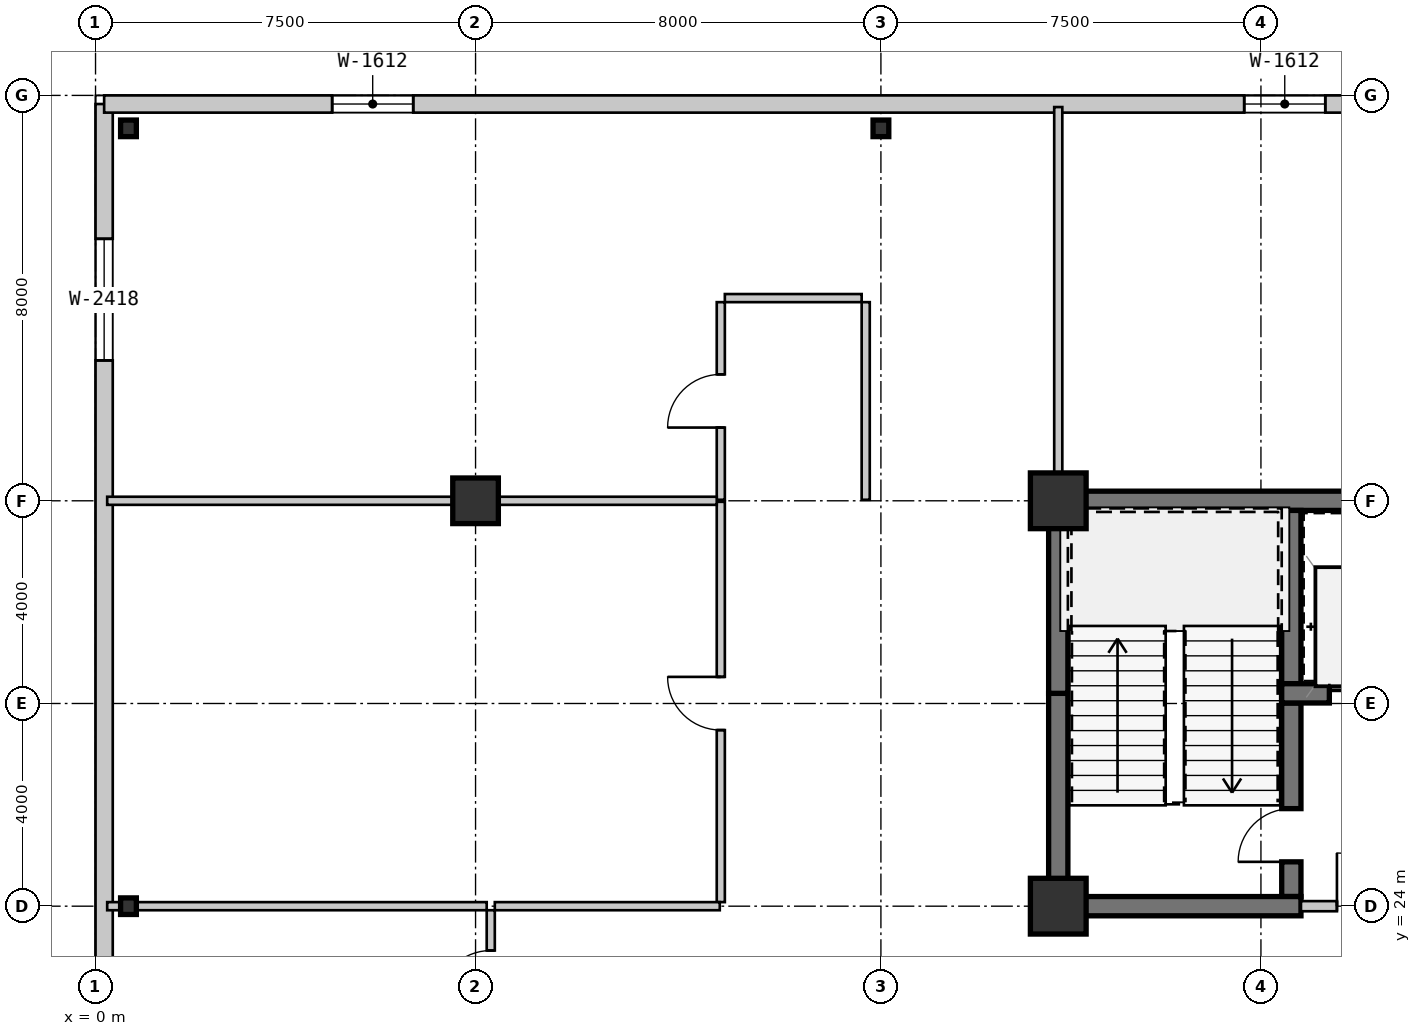
"""IFC4 building model, lengths in metres.
Left out: names, types, materials, properties, quantities, classifications, styles, units other than length and angle.
Written with IfcOpenShell. Run it as: python <this file> out.ifc"""

import sys

from ifc_helpers import new_model, si_unit, direction, frame, frame_2d, origin, origin_2d, place, context, subcontext, project, spatial, rectangle, circle, i_section, extrude, source, transform, mapped, element, fill, save


model = new_model("IFC4")
c1 = context("Model", 3, precision=1e-05, world=origin(), true_north=direction((0.0, 1.0)))
c2 = subcontext(c1, "Body", "Model", "MODEL_VIEW")
j1 = project(units=[si_unit("LENGTHUNIT", "METRE"), si_unit("PLANEANGLEUNIT", "RADIAN")], contexts=[c1])
p1 = place(None, origin())
s1 = spatial("IfcSite", under=j1, at=p1, CompositionType="ELEMENT")
p2 = place(p1, origin())
s2 = spatial("IfcBuilding", under=s1, at=p2, CompositionType="ELEMENT")
p3 = place(p2, frame((0.0, 0.0, 8.4)))
s3 = spatial("IfcBuildingStorey", under=s2, at=p3, CompositionType="ELEMENT", Elevation=8.4)
m1 = source(origin(), c2, "Body", "SweptSolid", [
    extrude(rectangle(XDim=1.1, YDim=1.1, at=origin_2d()), origin(), (0.0, 0.0, 1.0), 4.55),
])
for number, where, z_axis, x_axis in (
    (1, (19.0, 24.0, 0.0), (0.0, 0.0, 1.0), (1.0, 0.0, 0.0)),
    (2, (19.0, 32.0, 0.0), (0.0, 0.0, 1.0), (1.0, 0.0, 0.0)),
):
    element("IfcColumn", number, at=place(p3, frame(where, z_axis=z_axis, x_axis=x_axis)), inside=s3, PredefinedType="COLUMN", context=c2, shape_type="MappedRepresentation", body=[
        mapped(m1, transform((0.0, 0.0, 0.0), scale=1.0)),
    ])
m2 = source(origin(), c2, "Body", "SweptSolid", [
    extrude(circle(Radius=0.45, at=origin_2d()), origin(), (0.0, 0.0, 1.0), 4.55),
])
p4 = place(p3, frame((7.5, 32.0, 0.0), z_axis=(0.0, 0.0, 1.0), x_axis=(1.0, 0.0, 0.0)))
e3 = element("IfcColumn", 3, at=p4, inside=s3, PredefinedType="COLUMN", context=c2, shape_type="MappedRepresentation", body=[
    mapped(m2, transform((0.0, 0.0, 0.0), scale=1.0)),
])
m3 = source(origin(), c2, "Body", "SweptSolid", [
    extrude(i_section(OverallWidth=0.311, OverallDepth=0.327, WebThickness=0.016, FlangeThickness=0.025, at=origin_2d()), origin(), (0.0, 0.0, 1.0), 4.55),
])
for number, where, z_axis, x_axis in (
    (4, (0.65, 24.0, 0.0), (0.0, 0.0, 1.0), (1.0, 0.0, 0.0)),
    (5, (0.65, 39.35, 0.0), (0.0, 0.0, 1.0), (1.0, 0.0, 0.0)),
    (6, (15.5, 39.35, 0.0), (0.0, 0.0, 1.0), (1.0, 0.0, 0.0)),
):
    element("IfcColumn", number, at=place(p3, frame(where, z_axis=z_axis, x_axis=x_axis)), inside=s3, PredefinedType="COLUMN", context=c2, shape_type="MappedRepresentation", body=[
        mapped(m3, transform((0.0, 0.0, 0.0), scale=1.0)),
    ])
m4 = source(origin(), c2, "Body", "SweptSolid", [
    extrude(rectangle(XDim=39.66, YDim=0.34, at=frame_2d((19.83, 0.0))), origin(), (0.0, 0.0, 1.0), 4.29),
])
p5 = place(p3, frame((0.17, 0.17, 0.0), z_axis=(0.0, 0.0, 1.0), x_axis=(0.0, 1.0, 0.0)))
e7 = element("IfcWall", 7, at=p5, inside=s3, PredefinedType="SOLIDWALL", context=c2, shape_type="MappedRepresentation", body=[
    mapped(m4, transform((0.0, 0.0, 0.0), scale=1.0)),
])
m5 = source(origin(), c2, "Body", "SweptSolid", [
    extrude(rectangle(XDim=1.8, YDim=1.6, at=frame_2d((0.9, 0.8))), frame((0.0, 0.18, 0.0), z_axis=(0.0, -1.0, 0.0), x_axis=(1.0, 0.0, 0.0)), (0.0, 0.0, 1.0), 0.36),
])
p6 = place(p5, frame((3.2, 0.0, 0.95)))
e8 = element("IfcOpeningElement", 8, at=p6, cuts=e7, PredefinedType="OPENING", context=c2, shape_type="MappedRepresentation", body=[
    mapped(m5, transform((0.0, 0.0, 0.0), scale=1.0)),
])
m6 = source(origin(), c2, "Body", "SweptSolid", [
    extrude(rectangle(XDim=1.5, YDim=1.5, at=frame_2d((0.75, 0.75))), frame((0.0, 0.18, 0.0), z_axis=(0.0, -1.0, 0.0), x_axis=(1.0, 0.0, 0.0)), (0.0, 0.0, 1.0), 0.36),
])
p7 = place(p5, frame((7.8, 0.0, 0.95)))
e9 = element("IfcOpeningElement", 9, at=p7, cuts=e7, PredefinedType="OPENING", context=c2, shape_type="MappedRepresentation", body=[
    mapped(m6, transform((0.0, 0.0, 0.0), scale=1.0)),
])
m7 = source(origin(), c2, "Body", "SweptSolid", [
    extrude(rectangle(XDim=1.2, YDim=1.5, at=frame_2d((0.6, 0.75))), frame((0.0, 0.18, 0.0), z_axis=(0.0, -1.0, 0.0), x_axis=(1.0, 0.0, 0.0)), (0.0, 0.0, 1.0), 0.36),
])
p8 = place(p5, frame((21.2, 0.0, 0.95)))
e10 = element("IfcOpeningElement", 10, at=p8, cuts=e7, PredefinedType="OPENING", context=c2, shape_type="MappedRepresentation", body=[
    mapped(m7, transform((0.0, 0.0, 0.0), scale=1.0)),
])
m8 = source(origin(), c2, "Body", "SweptSolid", [
    extrude(rectangle(XDim=2.4, YDim=1.8, at=frame_2d((1.2, 0.9))), frame((0.0, 0.18, 0.0), z_axis=(0.0, -1.0, 0.0), x_axis=(1.0, 0.0, 0.0)), (0.0, 0.0, 1.0), 0.36),
])
p9 = place(p5, frame((34.6, 0.0, 0.95)))
e11 = element("IfcOpeningElement", 11, at=p9, cuts=e7, PredefinedType="OPENING", context=c2, shape_type="MappedRepresentation", body=[
    mapped(m8, transform((0.0, 0.0, 0.0), scale=1.0)),
])
m9 = source(origin(), c2, "Body", "SweptSolid", [
    extrude(rectangle(XDim=69.66, YDim=0.34, at=frame_2d((34.83, 0.0))), origin(), (0.0, 0.0, 1.0), 4.29),
])
p10 = place(p3, frame((0.17, 39.83, 0.0), z_axis=(0.0, 0.0, 1.0), x_axis=(1.0, 0.0, 0.0)))
e12 = element("IfcWall", 12, at=p10, inside=s3, PredefinedType="SOLIDWALL", context=c2, shape_type="MappedRepresentation", body=[
    mapped(m9, transform((0.0, 0.0, 0.0), scale=1.0)),
])
m10 = source(origin(), c2, "Body", "SweptSolid", [
    extrude(rectangle(XDim=1.6, YDim=1.2, at=frame_2d((0.8, 0.6))), frame((0.0, 0.18, 0.0), z_axis=(0.0, -1.0, 0.0), x_axis=(1.0, 0.0, 0.0)), (0.0, 0.0, 1.0), 0.36),
])
p11 = place(p10, frame((4.5, 0.0, 0.95)))
e13 = element("IfcOpeningElement", 13, at=p11, cuts=e12, PredefinedType="OPENING", context=c2, shape_type="MappedRepresentation", body=[
    mapped(m10, transform((0.0, 0.0, 0.0), scale=1.0)),
])
p12 = place(p10, frame((22.5, 0.0, 0.95)))
e14 = element("IfcOpeningElement", 14, at=p12, cuts=e12, PredefinedType="OPENING", context=c2, shape_type="MappedRepresentation", body=[
    mapped(m10, transform((0.0, 0.0, 0.0), scale=1.0)),
])
p13 = place(p10, frame((29.0, 0.0, 0.95)))
e15 = element("IfcOpeningElement", 15, at=p13, cuts=e12, PredefinedType="OPENING", context=c2, shape_type="MappedRepresentation", body=[
    mapped(m10, transform((0.0, 0.0, 0.0), scale=1.0)),
])
p14 = place(p10, frame((40.5, 0.0, 0.95)))
e16 = element("IfcOpeningElement", 16, at=p14, cuts=e12, PredefinedType="OPENING", context=c2, shape_type="MappedRepresentation", body=[
    mapped(m10, transform((0.0, 0.0, 0.0), scale=1.0)),
])
p15 = place(p10, frame((46.5, 0.0, 0.95)))
e17 = element("IfcOpeningElement", 17, at=p15, cuts=e12, PredefinedType="OPENING", context=c2, shape_type="MappedRepresentation", body=[
    mapped(m10, transform((0.0, 0.0, 0.0), scale=1.0)),
])
p16 = place(p10, frame((62.5, 0.0, 0.95)))
e18 = element("IfcOpeningElement", 18, at=p16, cuts=e12, PredefinedType="OPENING", context=c2, shape_type="MappedRepresentation", body=[
    mapped(m10, transform((0.0, 0.0, 0.0), scale=1.0)),
])
m11 = source(origin(), c2, "Body", "SweptSolid", [
    extrude(rectangle(XDim=9.19, YDim=0.38, at=frame_2d((4.595, 0.0))), origin(), (0.0, 0.0, 1.0), 4.29),
])
p17 = place(p3, frame((18.81, 32.0, 0.0), z_axis=(0.0, 0.0, 1.0), x_axis=(1.0, 0.0, 0.0)))
e19 = element("IfcWall", 19, at=p17, inside=s3, PredefinedType="SHEAR", context=c2, shape_type="MappedRepresentation", body=[
    mapped(m11, transform((0.0, 0.0, 0.0), scale=1.0)),
])
m12 = source(origin(), c2, "Body", "SweptSolid", [
    extrude(rectangle(XDim=4.01, YDim=0.38, at=frame_2d((2.005, 0.0))), origin(), (0.0, 0.0, 1.0), 4.29),
])
p18 = place(p3, frame((19.0, 24.19, 0.0), z_axis=(0.0, 0.0, 1.0), x_axis=(0.0, 1.0, 0.0)))
e20 = element("IfcWall", 20, at=p18, inside=s3, PredefinedType="SHEAR", context=c2, shape_type="MappedRepresentation", body=[
    mapped(m12, transform((0.0, 0.0, 0.0), scale=1.0)),
])
m13 = source(origin(), c2, "Body", "SweptSolid", [
    extrude(rectangle(XDim=3.61, YDim=0.38, at=frame_2d((1.805, 0.0))), origin(), (0.0, 0.0, 1.0), 4.29),
])
p19 = place(p3, frame((19.0, 28.2, 0.0), z_axis=(0.0, 0.0, 1.0), x_axis=(0.0, 1.0, 0.0)))
e21 = element("IfcWall", 21, at=p19, inside=s3, PredefinedType="SHEAR", context=c2, shape_type="MappedRepresentation", body=[
    mapped(m13, transform((0.0, 0.0, 0.0), scale=1.0)),
])
m14 = source(origin(), c2, "Body", "SweptSolid", [
    extrude(rectangle(XDim=3.42, YDim=0.38, at=frame_2d((1.71, 0.0))), origin(), (0.0, 0.0, 1.0), 4.29),
])
p20 = place(p3, frame((23.6, 28.39, 0.0), z_axis=(0.0, 0.0, 1.0), x_axis=(0.0, 1.0, 0.0)))
e22 = element("IfcWall", 22, at=p20, inside=s3, PredefinedType="SHEAR", context=c2, shape_type="MappedRepresentation", body=[
    mapped(m14, transform((0.0, 0.0, 0.0), scale=1.0)),
])
m15 = source(origin(), c2, "Body", "SweptSolid", [
    extrude(rectangle(XDim=3.82, YDim=0.38, at=frame_2d((1.91, 0.0))), origin(), (0.0, 0.0, 1.0), 4.29),
])
p21 = place(p3, frame((23.6, 24.19, 0.0), z_axis=(0.0, 0.0, 1.0), x_axis=(0.0, 1.0, 0.0)))
e23 = element("IfcWall", 23, at=p21, inside=s3, PredefinedType="SHEAR", context=c2, shape_type="MappedRepresentation", body=[
    mapped(m15, transform((0.0, 0.0, 0.0), scale=1.0)),
])
m16 = source(origin(), c2, "Body", "SweptSolid", [
    extrude(rectangle(XDim=1.05, YDim=2.1, at=frame_2d((0.525, 1.05))), frame((0.0, 0.2, 0.0), z_axis=(0.0, -1.0, 0.0), x_axis=(1.0, 0.0, 0.0)), (0.0, 0.0, 1.0), 0.4),
])
p22 = place(p21, frame((0.685, 0.0, 0.0)))
e24 = element("IfcOpeningElement", 24, at=p22, cuts=e23, PredefinedType="OPENING", context=c2, shape_type="MappedRepresentation", body=[
    mapped(m16, transform((0.0, 0.0, 0.0), scale=1.0)),
])
m17 = source(origin(), c2, "Body", "SweptSolid", [
    extrude(rectangle(XDim=4.98, YDim=0.38, at=frame_2d((2.49, 0.0))), origin(), (0.0, 0.0, 1.0), 4.29),
])
p23 = place(p3, frame((18.81, 24.0, 0.0), z_axis=(0.0, 0.0, 1.0), x_axis=(1.0, 0.0, 0.0)))
e25 = element("IfcWall", 25, at=p23, inside=s3, PredefinedType="SHEAR", context=c2, shape_type="MappedRepresentation", body=[
    mapped(m17, transform((0.0, 0.0, 0.0), scale=1.0)),
])
m18 = source(origin(), c2, "Body", "SweptSolid", [
    extrude(rectangle(XDim=2.98, YDim=0.38, at=frame_2d((1.49, 0.0))), origin(), (0.0, 0.0, 1.0), 4.29),
])
p24 = place(p3, frame((23.41, 28.2, 0.0), z_axis=(0.0, 0.0, 1.0), x_axis=(1.0, 0.0, 0.0)))
e26 = element("IfcWall", 26, at=p24, inside=s3, PredefinedType="SHEAR", context=c2, shape_type="MappedRepresentation", body=[
    mapped(m18, transform((0.0, 0.0, 0.0), scale=1.0)),
])
m19 = source(origin(), c2, "Body", "SweptSolid", [
    extrude(rectangle(XDim=1.1, YDim=2.15, at=frame_2d((0.55, 1.075))), frame((0.0, 0.2, 0.0), z_axis=(0.0, -1.0, 0.0), x_axis=(1.0, 0.0, 0.0)), (0.0, 0.0, 1.0), 0.4),
])
p25 = place(p24, frame((0.94, 0.0, 0.0)))
e27 = element("IfcOpeningElement", 27, at=p25, cuts=e26, PredefinedType="OPENING", context=c2, shape_type="MappedRepresentation", body=[
    mapped(m19, transform((0.0, 0.0, 0.0), scale=1.0)),
])
m20 = source(origin(), c2, "Body", "SweptSolid", [
    extrude(rectangle(XDim=2.66, YDim=0.2, at=frame_2d((1.33, 0.0))), origin(), (0.0, 0.0, 1.0), 3.83),
])
p26 = place(p3, frame((23.79, 24.0, 0.0), z_axis=(0.0, 0.0, 1.0), x_axis=(1.0, 0.0, 0.0)))
e28 = element("IfcWall", 28, at=p26, inside=s3, PredefinedType="SOLIDWALL", context=c2, shape_type="MappedRepresentation", body=[
    mapped(m20, transform((0.0, 0.0, 0.0), scale=1.0)),
])
m21 = source(origin(), c2, "Body", "SweptSolid", [
    extrude(rectangle(XDim=1.05, YDim=2.1, at=frame_2d((0.525, 1.05))), frame((0.0, 0.11, 0.0), z_axis=(0.0, -1.0, 0.0), x_axis=(1.0, 0.0, 0.0)), (0.0, 0.0, 1.0), 0.22),
])
p27 = place(p26, frame((0.71, 0.0, 0.0)))
e29 = element("IfcOpeningElement", 29, at=p27, cuts=e28, PredefinedType="OPENING", context=c2, shape_type="MappedRepresentation", body=[
    mapped(m21, transform((0.0, 0.0, 0.0), scale=1.0)),
])
m22 = source(origin(), c2, "Body", "SweptSolid", [
    extrude(rectangle(XDim=2.64, YDim=0.16, at=frame_2d((1.32, 0.0))), origin(), (0.0, 0.0, 1.0), 4.29),
])
p28 = place(p3, frame((7.8, 21.28, 0.0), z_axis=(0.0, 0.0, 1.0), x_axis=(0.0, 1.0, 0.0)))
e30 = element("IfcWall", 30, at=p28, inside=s3, PredefinedType="PARTITIONING", context=c2, shape_type="MappedRepresentation", body=[
    mapped(m22, transform((0.0, 0.0, 0.0), scale=1.0)),
])
m23 = source(origin(), c2, "Body", "SweptSolid", [
    extrude(rectangle(XDim=1.05, YDim=2.1, at=frame_2d((0.525, 1.05))), frame((0.0, 0.09, 0.0), z_axis=(0.0, -1.0, 0.0), x_axis=(1.0, 0.0, 0.0)), (0.0, 0.0, 1.0), 0.18),
])
p29 = place(p28, frame((0.795, 0.0, 0.0)))
e31 = element("IfcOpeningElement", 31, at=p29, cuts=e30, PredefinedType="OPENING", context=c2, shape_type="MappedRepresentation", body=[
    mapped(m23, transform((0.0, 0.0, 0.0), scale=1.0)),
])
m24 = source(origin(), c2, "Body", "SweptSolid", [
    extrude(rectangle(XDim=7.9, YDim=0.16, at=frame_2d((3.95, 0.0))), origin(), (0.0, 0.0, 1.0), 4.29),
])
p30 = place(p3, frame((12.34, 24.08, 0.0), z_axis=(0.0, 0.0, 1.0), x_axis=(0.0, 1.0, 0.0)))
e32 = element("IfcWall", 32, at=p30, inside=s3, PredefinedType="PARTITIONING", context=c2, shape_type="MappedRepresentation", body=[
    mapped(m24, transform((0.0, 0.0, 0.0), scale=1.0)),
])
p31 = place(p30, frame((3.395, 0.0, 0.0)))
e33 = element("IfcOpeningElement", 33, at=p31, cuts=e32, PredefinedType="OPENING", context=c2, shape_type="MappedRepresentation", body=[
    mapped(m23, transform((0.0, 0.0, 0.0), scale=1.0)),
])
m25 = source(origin(), c2, "Body", "SweptSolid", [
    extrude(rectangle(XDim=4.44, YDim=0.16, at=frame_2d((2.22, 0.0))), origin(), (0.0, 0.0, 1.0), 4.29),
])
p32 = place(p3, frame((7.88, 24.0, 0.0), z_axis=(0.0, 0.0, 1.0), x_axis=(1.0, 0.0, 0.0)))
e34 = element("IfcWall", 34, at=p32, inside=s3, PredefinedType="PARTITIONING", context=c2, shape_type="MappedRepresentation", body=[
    mapped(m25, transform((0.0, 0.0, 0.0), scale=1.0)),
])
m26 = source(origin(), c2, "Body", "SweptSolid", [
    extrude(rectangle(XDim=3.9, YDim=0.16, at=frame_2d((1.95, 0.0))), origin(), (0.0, 0.0, 1.0), 4.29),
])
p33 = place(p3, frame((12.34, 32.02, 0.0), z_axis=(0.0, 0.0, 1.0), x_axis=(0.0, 1.0, 0.0)))
e35 = element("IfcWall", 35, at=p33, inside=s3, PredefinedType="PARTITIONING", context=c2, shape_type="MappedRepresentation", body=[
    mapped(m26, transform((0.0, 0.0, 0.0), scale=1.0)),
])
p34 = place(p33, frame((1.425, 0.0, 0.0)))
e36 = element("IfcOpeningElement", 36, at=p34, cuts=e35, PredefinedType="OPENING", context=c2, shape_type="MappedRepresentation", body=[
    mapped(m23, transform((0.0, 0.0, 0.0), scale=1.0)),
])
p35 = place(p3, frame((15.2, 35.92, 0.0), z_axis=(0.0, 0.0, 1.0), x_axis=(0.0, -1.0, 0.0)))
e37 = element("IfcWall", 37, at=p35, inside=s3, PredefinedType="PARTITIONING", context=c2, shape_type="MappedRepresentation", body=[
    mapped(m26, transform((0.0, 0.0, 0.0), scale=1.0)),
])
m27 = source(origin(), c2, "Body", "SweptSolid", [
    extrude(rectangle(XDim=2.7, YDim=0.16, at=frame_2d((1.35, 0.0))), origin(), (0.0, 0.0, 1.0), 4.29),
])
p36 = place(p3, frame((12.42, 36.0, 0.0), z_axis=(0.0, 0.0, 1.0), x_axis=(1.0, 0.0, 0.0)))
e38 = element("IfcWall", 38, at=p36, inside=s3, PredefinedType="PARTITIONING", context=c2, shape_type="MappedRepresentation", body=[
    mapped(m27, transform((0.0, 0.0, 0.0), scale=1.0)),
])
m28 = source(origin(), c2, "Body", "SweptSolid", [
    extrude(rectangle(XDim=7.49, YDim=0.16, at=frame_2d((3.745, 0.0))), origin(), (0.0, 0.0, 1.0), 4.29),
])
p37 = place(p3, frame((0.23, 24.0, 0.0), z_axis=(0.0, 0.0, 1.0), x_axis=(1.0, 0.0, 0.0)))
e39 = element("IfcWall", 39, at=p37, inside=s3, PredefinedType="PARTITIONING", context=c2, shape_type="MappedRepresentation", body=[
    mapped(m28, transform((0.0, 0.0, 0.0), scale=1.0)),
])
m29 = source(origin(), c2, "Body", "SweptSolid", [
    extrude(rectangle(XDim=7.27, YDim=0.16, at=frame_2d((3.635, 0.0))), origin(), (0.0, 0.0, 1.0), 4.29),
])
p38 = place(p3, frame((0.23, 32.0, 0.0), z_axis=(0.0, 0.0, 1.0), x_axis=(1.0, 0.0, 0.0)))
e40 = element("IfcWall", 40, at=p38, inside=s3, PredefinedType="PARTITIONING", context=c2, shape_type="MappedRepresentation", body=[
    mapped(m29, transform((0.0, 0.0, 0.0), scale=1.0)),
])
m30 = source(origin(), c2, "Body", "SweptSolid", [
    extrude(rectangle(XDim=4.76, YDim=0.16, at=frame_2d((2.38, 0.0))), origin(), (0.0, 0.0, 1.0), 3.757),
])
p39 = place(p3, frame((7.5, 32.0, 0.0), z_axis=(0.0, 0.0, 1.0), x_axis=(1.0, 0.0, 0.0)))
e41 = element("IfcWall", 41, at=p39, inside=s3, PredefinedType="PARTITIONING", context=c2, shape_type="MappedRepresentation", body=[
    mapped(m30, transform((0.0, 0.0, 0.0), scale=1.0)),
])
m31 = source(origin(), c2, "Body", "SweptSolid", [
    extrude(rectangle(XDim=7.58, YDim=0.16, at=frame_2d((3.79, 0.0))), origin(), (0.0, 0.0, 1.0), 4.29),
])
p40 = place(p3, frame((19.0, 39.77, 0.0), z_axis=(0.0, 0.0, 1.0), x_axis=(0.0, -1.0, 0.0)))
e42 = element("IfcWall", 42, at=p40, inside=s3, PredefinedType="PARTITIONING", context=c2, shape_type="MappedRepresentation", body=[
    mapped(m31, transform((0.0, 0.0, 0.0), scale=1.0)),
])
m32 = source(origin(), c2, "Body", "SweptSolid", [
    extrude(rectangle(XDim=2.4, YDim=1.8, at=frame_2d((1.2, 0.9))), frame((0.0, 0.03, 0.0), z_axis=(0.0, -1.0, 0.0), x_axis=(1.0, 0.0, 0.0)), (0.0, 0.0, 1.0), 0.06),
])
p41 = place(p9, origin())
e43 = element("IfcWindow", 43, at=p41, inside=s3, PartitioningType="SINGLE_PANEL", PredefinedType="WINDOW", context=c2, shape_type="MappedRepresentation", body=[
    mapped(m32, transform((0.0, 0.0, 0.0), scale=1.0)),
])
fill(e11, e43)
m33 = source(origin(), c2, "Body", "SweptSolid", [
    extrude(rectangle(XDim=1.6, YDim=1.2, at=frame_2d((0.8, 0.6))), frame((0.0, 0.03, 0.0), z_axis=(0.0, -1.0, 0.0), x_axis=(1.0, 0.0, 0.0)), (0.0, 0.0, 1.0), 0.06),
])
p42 = place(p11, origin())
e44 = element("IfcWindow", 44, at=p42, inside=s3, PartitioningType="SINGLE_PANEL", PredefinedType="WINDOW", context=c2, shape_type="MappedRepresentation", body=[
    mapped(m33, transform((0.0, 0.0, 0.0), scale=1.0)),
])
fill(e13, e44)
p43 = place(p12, origin())
e45 = element("IfcWindow", 45, at=p43, inside=s3, PartitioningType="SINGLE_PANEL", PredefinedType="WINDOW", context=c2, shape_type="MappedRepresentation", body=[
    mapped(m33, transform((0.0, 0.0, 0.0), scale=1.0)),
])
fill(e14, e45)
m34 = source(origin(), c2, "Body", "SweptSolid", [
    extrude(rectangle(XDim=1.05, YDim=2.1, at=frame_2d((0.525, 1.05))), frame((0.0, 0.025, 0.0), z_axis=(0.0, -1.0, 0.0), x_axis=(1.0, 0.0, 0.0)), (0.0, 0.0, 1.0), 0.05),
])
p44 = place(p22, origin())
e46 = element("IfcDoor", 46, at=p44, inside=s3, OperationType="SINGLE_SWING_LEFT", PredefinedType="DOOR", context=c2, shape_type="MappedRepresentation", body=[
    mapped(m34, transform((0.0, 0.0, 0.0), scale=1.0)),
])
fill(e24, e46)
m35 = source(origin(), c2, "Body", "SweptSolid", [
    extrude(rectangle(XDim=1.1, YDim=2.15, at=frame_2d((0.55, 1.075))), frame((0.0, 0.025, 0.0), z_axis=(0.0, -1.0, 0.0), x_axis=(1.0, 0.0, 0.0)), (0.0, 0.0, 1.0), 0.05),
])
p45 = place(p25, origin())
e47 = element("IfcDoor", 47, at=p45, inside=s3, OperationType="SLIDING_TO_LEFT", PredefinedType="DOOR", context=c2, shape_type="MappedRepresentation", body=[
    mapped(m35, transform((0.0, 0.0, 0.0), scale=1.0)),
])
fill(e27, e47)
p46 = place(p27, origin())
e48 = element("IfcDoor", 48, at=p46, inside=s3, OperationType="SINGLE_SWING_LEFT", PredefinedType="DOOR", context=c2, shape_type="MappedRepresentation", body=[
    mapped(m34, transform((0.0, 0.0, 0.0), scale=1.0)),
])
fill(e29, e48)
p47 = place(p29, origin())
e49 = element("IfcDoor", 49, at=p47, inside=s3, OperationType="SINGLE_SWING_LEFT", PredefinedType="DOOR", context=c2, shape_type="MappedRepresentation", body=[
    mapped(m34, transform((0.0, 0.0, 0.0), scale=1.0)),
])
fill(e31, e49)
p48 = place(p31, origin())
e50 = element("IfcDoor", 50, at=p48, inside=s3, OperationType="SINGLE_SWING_RIGHT", PredefinedType="DOOR", context=c2, shape_type="MappedRepresentation", body=[
    mapped(m34, transform((0.0, 0.0, 0.0), scale=1.0)),
])
fill(e33, e50)
p49 = place(p34, origin())
e51 = element("IfcDoor", 51, at=p49, inside=s3, OperationType="SINGLE_SWING_LEFT", PredefinedType="DOOR", context=c2, shape_type="MappedRepresentation", body=[
    mapped(m34, transform((0.0, 0.0, 0.0), scale=1.0)),
])
fill(e36, e51)
save(model, sys.argv[1])
